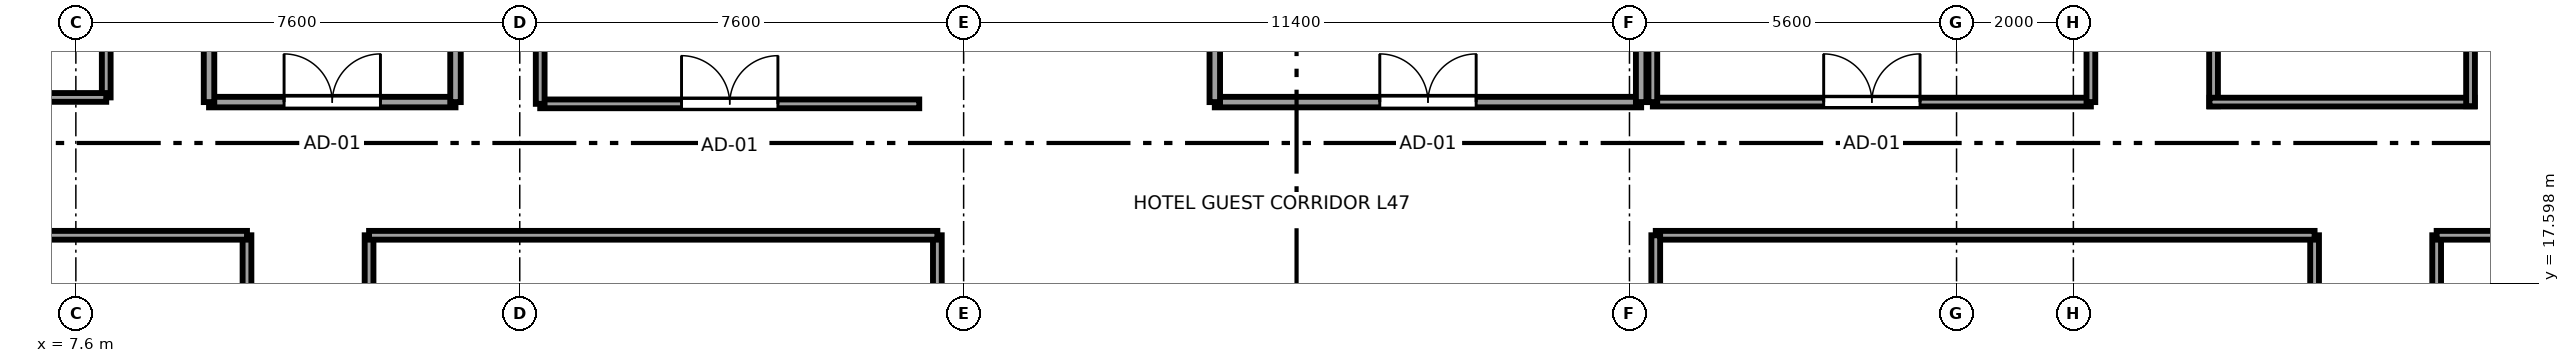
"""IFC4 building model, lengths in metres.
Left out: names, types, materials, properties, quantities, classifications, styles, units other than length and angle.
Written with IfcOpenShell. Run it as: python <this file> out.ifc"""

import sys

from ifc_helpers import new_model, si_unit, direction, frame, frame_2d, origin, place, context, subcontext, project, spatial, rectangle, extrude, source, transform, mapped, element, fill, save


model = new_model("IFC4")
c1 = context("Model", 3, precision=1e-05, world=origin(), true_north=direction((0.0, 1.0)))
c2 = subcontext(c1, "Body", "Model", "MODEL_VIEW")
j1 = project(units=[si_unit("LENGTHUNIT", "METRE"), si_unit("PLANEANGLEUNIT", "RADIAN")], contexts=[c1])
p1 = place(None, origin())
s1 = spatial("IfcSite", under=j1, at=p1, CompositionType="ELEMENT")
p2 = place(p1, origin())
s2 = spatial("IfcBuilding", under=s1, at=p2, CompositionType="ELEMENT")
p3 = place(p2, frame((0.0, 0.0, 179.0)))
s3 = spatial("IfcBuildingStorey", under=s2, at=p3, CompositionType="ELEMENT", Elevation=179.0)
p4 = place(p3, frame((10.53, 15.313, 0.0), z_axis=(0.0, 0.0, 1.0), x_axis=(0.0, 1.0, 0.0)))
e1 = element("IfcWall", 1, at=p4, inside=s3, PredefinedType="PARTITIONING", context=c2, shape_type="SweptSolid", body=[
    extrude(rectangle(XDim=3.107, YDim=0.15, at=frame_2d((1.553, 0.0))), origin(), (0.0, 0.0, 1.0), 3.25),
])
p5 = place(p4, frame((1.043, 0.0, 0.0)))
e2 = element("IfcOpeningElement", 2, at=p5, cuts=e1, PredefinedType="OPENING", context=c2, shape_type="SweptSolid", body=[
    extrude(rectangle(XDim=0.98, YDim=2.12, at=frame_2d((0.49, 1.06))), frame((0.0, 0.085, 0.0), z_axis=(0.0, -1.0, 0.0), x_axis=(1.0, 0.0, 0.0)), (0.0, 0.0, 1.0), 0.17),
])
p6 = place(p3, frame((3.005, 18.42, 0.0), z_axis=(0.0, 0.0, 1.0), x_axis=(1.0, 0.0, 0.0)))
e3 = element("IfcWall", 3, at=p6, inside=s3, PredefinedType="PARTITIONING", context=c2, shape_type="SweptSolid", body=[
    extrude(rectangle(XDim=7.525, YDim=0.15, at=frame_2d((3.763, 0.0))), origin(), (0.0, 0.0, 1.0), 3.25),
])
p7 = place(p3, frame((12.62, 13.21, 0.0), z_axis=(0.0, 0.0, 1.0), x_axis=(0.0, 1.0, 0.0)))
e4 = element("IfcWall", 4, at=p7, inside=s3, PredefinedType="PARTITIONING", context=c2, shape_type="SweptSolid", body=[
    extrude(rectangle(XDim=5.21, YDim=0.15, at=frame_2d((2.605, 0.0))), origin(), (0.0, 0.0, 1.0), 3.25),
])
p8 = place(p7, frame((2.095, 0.0, 0.0)))
e5 = element("IfcOpeningElement", 5, at=p8, cuts=e4, PredefinedType="OPENING", context=c2, shape_type="SweptSolid", body=[
    extrude(rectangle(XDim=0.98, YDim=2.12, at=frame_2d((0.49, 1.06))), frame((0.0, 0.085, 0.0), z_axis=(0.0, -1.0, 0.0), x_axis=(1.0, 0.0, 0.0)), (0.0, 0.0, 1.0), 0.17),
])
p9 = place(p3, frame((22.35, 10.88, 0.0), z_axis=(0.0, 0.0, 1.0), x_axis=(0.0, 1.0, 0.0)))
e6 = element("IfcWall", 6, at=p9, inside=s3, PredefinedType="PARTITIONING", context=c2, shape_type="SweptSolid", body=[
    extrude(rectangle(XDim=7.54, YDim=0.15, at=frame_2d((3.77, 0.0))), origin(), (0.0, 0.0, 1.0), 3.25),
])
p10 = place(p3, frame((12.62, 18.42, 0.0), z_axis=(0.0, 0.0, 1.0), x_axis=(1.0, 0.0, 0.0)))
e7 = element("IfcWall", 7, at=p10, inside=s3, PredefinedType="PARTITIONING", context=c2, shape_type="SweptSolid", body=[
    extrude(rectangle(XDim=9.73, YDim=0.15, at=frame_2d((4.865, 0.0))), origin(), (0.0, 0.0, 1.0), 3.25),
])
p11 = place(p3, frame((45.93, 15.437, 0.0), z_axis=(0.0, 0.0, 1.0), x_axis=(0.0, 1.0, 0.0)))
e8 = element("IfcWall", 8, at=p11, inside=s3, PredefinedType="PARTITIONING", context=c2, shape_type="SweptSolid", body=[
    extrude(rectangle(XDim=2.983, YDim=0.15, at=frame_2d((1.491, 0.0))), origin(), (0.0, 0.0, 1.0), 3.25),
])
p12 = place(p11, frame((0.981, 0.0, 0.0)))
e9 = element("IfcOpeningElement", 9, at=p12, cuts=e8, PredefinedType="OPENING", context=c2, shape_type="SweptSolid", body=[
    extrude(rectangle(XDim=0.98, YDim=2.12, at=frame_2d((0.49, 1.06))), frame((0.0, 0.085, 0.0), z_axis=(0.0, -1.0, 0.0), x_axis=(1.0, 0.0, 0.0)), (0.0, 0.0, 1.0), 0.17),
])
p13 = place(p3, frame((34.65, 18.42, 0.0), z_axis=(0.0, 0.0, 1.0), x_axis=(1.0, 0.0, 0.0)))
e10 = element("IfcWall", 10, at=p13, inside=s3, PredefinedType="PARTITIONING", context=c2, shape_type="SweptSolid", body=[
    extrude(rectangle(XDim=11.28, YDim=0.15, at=frame_2d((5.64, 0.0))), origin(), (0.0, 0.0, 1.0), 3.25),
])
p14 = place(p3, frame((34.65, 13.48, 0.0), z_axis=(0.0, 0.0, 1.0), x_axis=(0.0, 1.0, 0.0)))
e11 = element("IfcWall", 11, at=p14, inside=s3, PredefinedType="PARTITIONING", context=c2, shape_type="SweptSolid", body=[
    extrude(rectangle(XDim=4.94, YDim=0.15, at=frame_2d((2.47, 0.0))), origin(), (0.0, 0.0, 1.0), 3.25),
])
p15 = place(p3, frame((48.02, 15.313, 0.0), z_axis=(0.0, 0.0, 1.0), x_axis=(0.0, 1.0, 0.0)))
e12 = element("IfcWall", 12, at=p15, inside=s3, PredefinedType="PARTITIONING", context=c2, shape_type="SweptSolid", body=[
    extrude(rectangle(XDim=3.107, YDim=0.15, at=frame_2d((1.553, 0.0))), origin(), (0.0, 0.0, 1.0), 3.25),
])
p16 = place(p15, frame((1.043, 0.0, 0.0)))
e13 = element("IfcOpeningElement", 13, at=p16, cuts=e12, PredefinedType="OPENING", context=c2, shape_type="SweptSolid", body=[
    extrude(rectangle(XDim=0.98, YDim=2.12, at=frame_2d((0.49, 1.06))), frame((0.0, 0.085, 0.0), z_axis=(0.0, -1.0, 0.0), x_axis=(1.0, 0.0, 0.0)), (0.0, 0.0, 1.0), 0.17),
])
p17 = place(p3, frame((48.02, 18.42, 0.0), z_axis=(0.0, 0.0, 1.0), x_axis=(1.0, 0.0, 0.0)))
e14 = element("IfcWall", 14, at=p17, inside=s3, PredefinedType="PARTITIONING", context=c2, shape_type="SweptSolid", body=[
    extrude(rectangle(XDim=5.975, YDim=0.15, at=frame_2d((2.988, 0.0))), origin(), (0.0, 0.0, 1.0), 3.25),
])
p18 = place(p3, frame((8.12, 20.78, 0.0), z_axis=(0.0, 0.0, 1.0), x_axis=(0.0, 1.0, 0.0)))
e15 = element("IfcWall", 15, at=p18, inside=s3, PredefinedType="PARTITIONING", context=c2, shape_type="SweptSolid", body=[
    extrude(rectangle(XDim=13.54, YDim=0.15, at=frame_2d((6.77, 0.0))), origin(), (0.0, 0.0, 1.0), 3.25),
])
p19 = place(p18, frame((6.28, 0.0, 0.0)))
e16 = element("IfcOpeningElement", 16, at=p19, cuts=e15, PredefinedType="OPENING", context=c2, shape_type="SweptSolid", body=[
    extrude(rectangle(XDim=0.98, YDim=2.12, at=frame_2d((0.49, 1.06))), frame((0.0, 0.085, 0.0), z_axis=(0.0, -1.0, 0.0), x_axis=(1.0, 0.0, 0.0)), (0.0, 0.0, 1.0), 0.17),
])
p20 = place(p3, frame((5.07, 20.78, 0.0), z_axis=(0.0, 0.0, 1.0), x_axis=(1.0, 0.0, 0.0)))
e17 = element("IfcWall", 17, at=p20, inside=s3, PredefinedType="PARTITIONING", context=c2, shape_type="SweptSolid", body=[
    extrude(rectangle(XDim=3.05, YDim=0.15, at=frame_2d((1.525, 0.0))), origin(), (0.0, 0.0, 1.0), 3.25),
])
p21 = place(p3, frame((44.2, 20.63, 0.0), z_axis=(0.0, 0.0, 1.0), x_axis=(0.0, 1.0, 0.0)))
e18 = element("IfcWall", 18, at=p21, inside=s3, PredefinedType="PARTITIONING", context=c2, shape_type="SweptSolid", body=[
    extrude(rectangle(XDim=3.94, YDim=0.15, at=frame_2d((1.97, 0.0))), origin(), (0.0, 0.0, 1.0), 3.25),
])
p22 = place(p21, frame((1.34, 0.0, 0.0)))
e19 = element("IfcOpeningElement", 19, at=p22, cuts=e18, PredefinedType="OPENING", context=c2, shape_type="SweptSolid", body=[
    extrude(rectangle(XDim=0.92, YDim=2.01, at=frame_2d((0.46, 1.005))), frame((0.0, 0.085, 0.0), z_axis=(0.0, -1.0, 0.0), x_axis=(1.0, 0.0, 0.0)), (0.0, 0.0, 1.0), 0.17),
])
p23 = place(p3, frame((44.13, 20.7, 0.0), z_axis=(0.0, 0.0, 1.0), x_axis=(1.0, 0.0, 0.0)))
e20 = element("IfcWall", 20, at=p23, inside=s3, PredefinedType="PARTITIONING", context=c2, shape_type="SweptSolid", body=[
    extrude(rectangle(XDim=4.54, YDim=0.15, at=frame_2d((2.27, 0.0))), origin(), (0.0, 0.0, 1.0), 3.25),
])
p24 = place(p3, frame((48.6, 20.63, 0.0), z_axis=(0.0, 0.0, 1.0), x_axis=(0.0, 1.0, 0.0)))
e21 = element("IfcWall", 21, at=p24, inside=s3, PredefinedType="PARTITIONING", context=c2, shape_type="SweptSolid", body=[
    extrude(rectangle(XDim=3.94, YDim=0.15, at=frame_2d((1.97, 0.0))), origin(), (0.0, 0.0, 1.0), 3.25),
])
p25 = place(p3, frame((9.88, 20.7, 0.0), z_axis=(0.0, 0.0, 1.0), x_axis=(1.0, 0.0, 0.0)))
e22 = element("IfcWall", 22, at=p25, inside=s3, PredefinedType="PARTITIONING", context=c2, shape_type="SweptSolid", body=[
    extrude(rectangle(XDim=4.22, YDim=0.18, at=frame_2d((2.11, 0.0))), origin(), (0.0, 0.0, 1.0), 3.25),
])
p26 = place(p25, frame((1.285, 0.0, 0.0)))
e23 = element("IfcOpeningElement", 23, at=p26, cuts=e22, PredefinedType="OPENING", context=c2, shape_type="SweptSolid", body=[
    extrude(rectangle(XDim=1.65, YDim=2.15, at=frame_2d((0.825, 1.075))), frame((0.0, 0.1, 0.0), z_axis=(0.0, -1.0, 0.0), x_axis=(1.0, 0.0, 0.0)), (0.0, 0.0, 1.0), 0.2),
])
for number, where, z_axis, x_axis in (
    (24, (9.88, 20.7, 0.0), (0.0, 0.0, 1.0), (0.0, 1.0, 0.0)),
    (25, (14.1, 20.7, 0.0), (0.0, 0.0, 1.0), (0.0, 1.0, 0.0)),
):
    element("IfcWall", number, at=place(p3, frame(where, z_axis=z_axis, x_axis=x_axis)), inside=s3, PredefinedType="PARTITIONING", context=c2, shape_type="SweptSolid", body=[
        extrude(rectangle(XDim=9.05, YDim=0.18, at=frame_2d((4.525, 0.0))), origin(), (0.0, 0.0, 1.0), 3.25),
    ])
p27 = place(p3, frame((27.1, 20.7, 0.0), z_axis=(0.0, 0.0, 1.0), x_axis=(1.0, 0.0, 0.0)))
e26 = element("IfcWall", 26, at=p27, inside=s3, PredefinedType="PARTITIONING", context=c2, shape_type="SweptSolid", body=[
    extrude(rectangle(XDim=7.3, YDim=0.18, at=frame_2d((3.65, 0.0))), origin(), (0.0, 0.0, 1.0), 3.25),
])
p28 = place(p27, frame((2.825, 0.0, 0.0)))
e27 = element("IfcOpeningElement", 27, at=p28, cuts=e26, PredefinedType="OPENING", context=c2, shape_type="SweptSolid", body=[
    extrude(rectangle(XDim=1.65, YDim=2.15, at=frame_2d((0.825, 1.075))), frame((0.0, 0.1, 0.0), z_axis=(0.0, -1.0, 0.0), x_axis=(1.0, 0.0, 0.0)), (0.0, 0.0, 1.0), 0.2),
])
for number, where, z_axis, x_axis in (
    (28, (27.1, 20.7, 0.0), (0.0, 0.0, 1.0), (0.0, 1.0, 0.0)),
    (29, (34.4, 20.7, 0.0), (0.0, 0.0, 1.0), (0.0, 1.0, 0.0)),
):
    element("IfcWall", number, at=place(p3, frame(where, z_axis=z_axis, x_axis=x_axis)), inside=s3, PredefinedType="PARTITIONING", context=c2, shape_type="SweptSolid", body=[
        extrude(rectangle(XDim=9.1, YDim=0.18, at=frame_2d((4.55, 0.0))), origin(), (0.0, 0.0, 1.0), 3.25),
    ])
p29 = place(p3, frame((15.55, 20.67, 0.0), z_axis=(0.0, 0.0, 1.0), x_axis=(1.0, 0.0, 0.0)))
e30 = element("IfcWall", 30, at=p29, inside=s3, PredefinedType="PARTITIONING", context=c2, shape_type="SweptSolid", body=[
    extrude(rectangle(XDim=6.49, YDim=0.15, at=frame_2d((3.245, 0.0))), origin(), (0.0, 0.0, 1.0), 3.25),
])
p30 = place(p29, frame((2.42, 0.0, 0.0)))
e31 = element("IfcOpeningElement", 31, at=p30, cuts=e30, PredefinedType="OPENING", context=c2, shape_type="SweptSolid", body=[
    extrude(rectangle(XDim=1.65, YDim=2.15, at=frame_2d((0.825, 1.075))), frame((0.0, 0.085, 0.0), z_axis=(0.0, -1.0, 0.0), x_axis=(1.0, 0.0, 0.0)), (0.0, 0.0, 1.0), 0.17),
])
p31 = place(p3, frame((15.55, 20.67, 0.0), z_axis=(0.0, 0.0, 1.0), x_axis=(0.0, 1.0, 0.0)))
e32 = element("IfcWall", 32, at=p31, inside=s3, PredefinedType="PARTITIONING", context=c2, shape_type="SweptSolid", body=[
    extrude(rectangle(XDim=4.08, YDim=0.15, at=frame_2d((2.04, 0.0))), origin(), (0.0, 0.0, 1.0), 3.25),
])
p32 = place(p3, frame((34.6, 20.7, 0.0), z_axis=(0.0, 0.0, 1.0), x_axis=(1.0, 0.0, 0.0)))
e33 = element("IfcWall", 33, at=p32, inside=s3, PredefinedType="PARTITIONING", context=c2, shape_type="SweptSolid", body=[
    extrude(rectangle(XDim=7.5, YDim=0.15, at=frame_2d((3.75, 0.0))), origin(), (0.0, 0.0, 1.0), 3.25),
])
p33 = place(p32, frame((2.925, 0.0, 0.0)))
e34 = element("IfcOpeningElement", 34, at=p33, cuts=e33, PredefinedType="OPENING", context=c2, shape_type="SweptSolid", body=[
    extrude(rectangle(XDim=1.65, YDim=2.15, at=frame_2d((0.825, 1.075))), frame((0.0, 0.085, 0.0), z_axis=(0.0, -1.0, 0.0), x_axis=(1.0, 0.0, 0.0)), (0.0, 0.0, 1.0), 0.17),
])
p34 = place(p3, frame((34.6, 20.7, 0.0), z_axis=(0.0, 0.0, 1.0), x_axis=(0.0, 1.0, 0.0)))
e35 = element("IfcWall", 35, at=p34, inside=s3, PredefinedType="PARTITIONING", context=c2, shape_type="SweptSolid", body=[
    extrude(rectangle(XDim=8.7, YDim=0.15, at=frame_2d((4.35, 0.0))), origin(), (0.0, 0.0, 1.0), 3.25),
])
p35 = place(p3, frame((42.1, 20.7, 0.0), z_axis=(0.0, 0.0, 1.0), x_axis=(0.0, 1.0, 0.0)))
e36 = element("IfcWall", 36, at=p35, inside=s3, PredefinedType="PARTITIONING", context=c2, shape_type="SweptSolid", body=[
    extrude(rectangle(XDim=8.7, YDim=0.15, at=frame_2d((4.35, 0.0))), origin(), (0.0, 0.0, 1.0), 2.04),
])
m1 = source(origin(), c2, "Body", "SweptSolid", [
    extrude(rectangle(XDim=1.65, YDim=2.15, at=frame_2d((0.825, 1.075))), frame((0.0, 0.025, 0.0), z_axis=(0.0, -1.0, 0.0), x_axis=(1.0, 0.0, 0.0)), (0.0, 0.0, 1.0), 0.05),
])
p36 = place(p26, origin())
e37 = element("IfcDoor", 37, at=p36, inside=s3, OperationType="DOUBLE_DOOR_SINGLE_SWING", PredefinedType="DOOR", context=c2, shape_type="MappedRepresentation", body=[
    mapped(m1, transform((0.0, 0.0, 0.0), x_axis=(1.0, 0.0, 0.0), y_axis=(0.0, 1.0, 0.0), z_axis=(0.0, 0.0, 1.0), scale=1.0)),
])
fill(e23, e37)
p37 = place(p28, origin())
e38 = element("IfcDoor", 38, at=p37, inside=s3, OperationType="DOUBLE_DOOR_SINGLE_SWING", PredefinedType="DOOR", context=c2, shape_type="MappedRepresentation", body=[
    mapped(m1, transform((0.0, 0.0, 0.0), x_axis=(1.0, 0.0, 0.0), y_axis=(0.0, 1.0, 0.0), z_axis=(0.0, 0.0, 1.0), scale=1.0)),
])
fill(e27, e38)
p38 = place(p30, origin())
e39 = element("IfcDoor", 39, at=p38, inside=s3, OperationType="DOUBLE_DOOR_SINGLE_SWING", PredefinedType="DOOR", context=c2, shape_type="MappedRepresentation", body=[
    mapped(m1, transform((0.0, 0.0, 0.0), x_axis=(1.0, 0.0, 0.0), y_axis=(0.0, 1.0, 0.0), z_axis=(0.0, 0.0, 1.0), scale=1.0)),
])
fill(e31, e39)
p39 = place(p33, origin())
e40 = element("IfcDoor", 40, at=p39, inside=s3, OperationType="DOUBLE_DOOR_SINGLE_SWING", PredefinedType="DOOR", context=c2, shape_type="MappedRepresentation", body=[
    mapped(m1, transform((0.0, 0.0, 0.0), x_axis=(1.0, 0.0, 0.0), y_axis=(0.0, 1.0, 0.0), z_axis=(0.0, 0.0, 1.0), scale=1.0)),
])
fill(e34, e40)
save(model, sys.argv[1])
